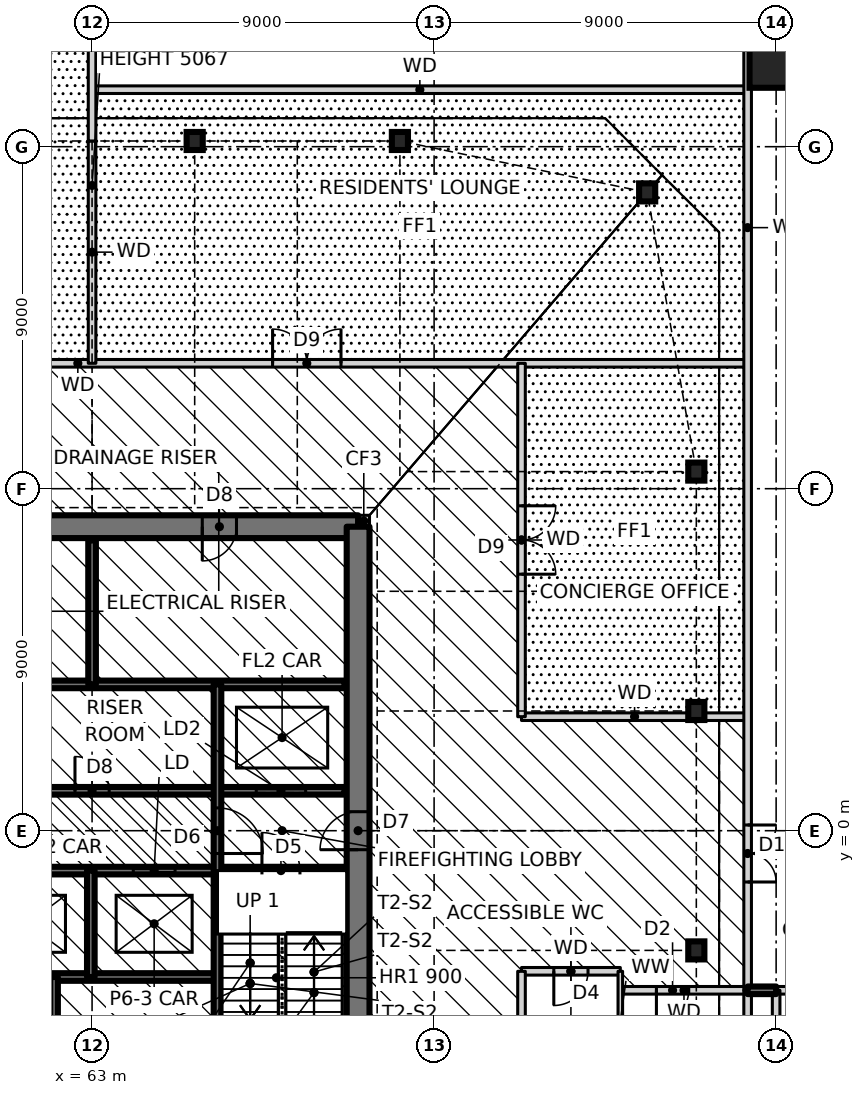
"""IFC4 building model, lengths in metres.
Left out: names, types, materials, properties, quantities, classifications, styles, units other than length and angle.
Written with IfcOpenShell. Run it as: python <this file> out.ifc"""

import sys

from ifc_helpers import new_model, si_unit, direction, frame, frame_2d, origin, origin_2d, place, context, subcontext, project, spatial, rectangle, hollow_rectangle, i_section, extrude, element, fill, save


model = new_model("IFC4")
c1 = context("Model", 3, precision=1e-05, world=origin(), true_north=direction((0.0, 1.0)))
c2 = subcontext(c1, "Body", "Model", "MODEL_VIEW")
j1 = project(units=[si_unit("LENGTHUNIT", "METRE"), si_unit("PLANEANGLEUNIT", "RADIAN")], contexts=[c1])
p1 = place(None, origin())
s1 = spatial("IfcSite", under=j1, at=p1, CompositionType="ELEMENT")
p2 = place(p1, origin())
s2 = spatial("IfcBuilding", under=s1, at=p2, CompositionType="ELEMENT")
p3 = place(p2, origin())
s3 = spatial("IfcBuildingStorey", under=s2, at=p3, CompositionType="ELEMENT", Elevation=0.0)
for number, where, z_axis, x_axis in (
    (1, (78.9, -3.15, 0.0), (0.0, 0.0, 1.0), (1.0, 0.0, 0.0)),
    (2, (78.9, 3.15, 0.0), (0.0, 0.0, 1.0), (1.0, 0.0, 0.0)),
    (3, (78.9, 9.45, 0.0), (0.0, 0.0, 1.0), (1.0, 0.0, 0.0)),
    (4, (77.606, 16.797, 0.0), (0.0, 0.0, 1.0), (1.0, 0.0, 0.0)),
    (5, (71.1, 18.15, 0.0), (0.0, 0.0, 1.0), (1.0, 0.0, 0.0)),
    (6, (65.7, 18.15, 0.0), (0.0, 0.0, 1.0), (1.0, 0.0, 0.0)),
):
    element("IfcColumn", number, at=place(p3, frame(where, z_axis=z_axis, x_axis=x_axis)), inside=s3, PredefinedType="COLUMN", context=c2, shape_type="SweptSolid", body=[
        extrude(i_section(OverallWidth=0.424, OverallDepth=0.475, WebThickness=0.048, FlangeThickness=0.077, at=origin_2d()), origin(), (0.0, 0.0, 1.0), 6.0),
    ])
p4 = place(p3, frame((80.9, 20.15, 0.0), z_axis=(0.0, 0.0, 1.0), x_axis=(1.0, 0.0, 0.0)))
e7 = element("IfcColumn", 7, at=p4, inside=s3, PredefinedType="COLUMN", context=c2, shape_type="SweptSolid", body=[
    extrude(hollow_rectangle(XDim=1.2, YDim=1.2, WallThickness=0.07, at=origin_2d()), origin(), (0.0, 0.0, 1.0), 6.0),
])
p5 = place(p3, frame((70.0, 8.15, 0.0), z_axis=(0.0, 0.0, 1.0), x_axis=(1.0, 0.0, 0.0)))
e8 = element("IfcWall", 8, at=p5, inside=s3, PredefinedType="SOLIDWALL", context=c2, shape_type="SweptSolid", body=[
    extrude(rectangle(XDim=0.3, YDim=0.3, at=frame_2d((0.15, 0.0))), origin(), (0.0, 0.0, 1.0), 6.0),
])
p6 = place(p3, frame((70.0, 8.0, 0.0), z_axis=(0.0, 0.0, 1.0), x_axis=(-1.0, 0.0, 0.0)))
e9 = element("IfcWall", 9, at=p6, inside=s3, PredefinedType="SHEAR", context=c2, shape_type="SweptSolid", body=[
    extrude(rectangle(XDim=14.0, YDim=0.6, at=frame_2d((7.0, 0.0))), origin(), (0.0, 0.0, 1.0), 6.0),
])
p7 = place(p6, frame((8.2, 0.0, 0.0)))
e10 = element("IfcOpeningElement", 10, at=p7, cuts=e9, PredefinedType="OPENING", context=c2, shape_type="SweptSolid", body=[
    extrude(rectangle(XDim=0.9, YDim=2.1, at=frame_2d((0.45, 1.05))), frame((0.0, 0.31, 0.0), z_axis=(0.0, -1.0, 0.0), x_axis=(1.0, 0.0, 0.0)), (0.0, 0.0, 1.0), 0.62),
])
p8 = place(p6, frame((3.2, 0.0, 0.0)))
e11 = element("IfcOpeningElement", 11, at=p8, cuts=e9, PredefinedType="OPENING", context=c2, shape_type="SweptSolid", body=[
    extrude(rectangle(XDim=0.9, YDim=2.1, at=frame_2d((0.45, 1.05))), frame((0.0, 0.31, 0.0), z_axis=(0.0, -1.0, 0.0), x_axis=(1.0, 0.0, 0.0)), (0.0, 0.0, 1.0), 0.62),
])
p9 = place(p3, frame((70.0, -8.0, 0.0), z_axis=(0.0, 0.0, 1.0), x_axis=(0.0, 1.0, 0.0)))
e12 = element("IfcWall", 12, at=p9, inside=s3, PredefinedType="SHEAR", context=c2, shape_type="SweptSolid", body=[
    extrude(rectangle(XDim=16.0, YDim=0.6, at=frame_2d((8.0, 0.0))), origin(), (0.0, 0.0, 1.0), 6.0),
])
p10 = place(p9, frame((7.5, 0.0, 0.0)))
e13 = element("IfcOpeningElement", 13, at=p10, cuts=e12, PredefinedType="OPENING", context=c2, shape_type="SweptSolid", body=[
    extrude(rectangle(XDim=1.0, YDim=2.1, at=frame_2d((0.5, 1.05))), frame((0.0, 0.31, 0.0), z_axis=(0.0, -1.0, 0.0), x_axis=(1.0, 0.0, 0.0)), (0.0, 0.0, 1.0), 0.62),
])
p11 = place(p3, frame((76.9, -4.2, 0.0), z_axis=(0.0, 0.0, 1.0), x_axis=(1.0, 0.0, 0.0)))
e14 = element("IfcWall", 14, at=p11, inside=s3, PredefinedType="SOLIDWALL", context=c2, shape_type="SweptSolid", body=[
    extrude(rectangle(XDim=3.35, YDim=0.2, at=frame_2d((1.675, 0.0))), origin(), (0.0, 0.0, 1.0), 5.75),
])
p12 = place(p11, frame((0.95, 0.0, 0.0)))
e15 = element("IfcOpeningElement", 15, at=p12, cuts=e14, PredefinedType="OPENING", context=c2, shape_type="SweptSolid", body=[
    extrude(rectangle(XDim=0.85, YDim=2.1, at=frame_2d((0.425, 1.05))), frame((0.0, 0.11, 0.0), z_axis=(0.0, -1.0, 0.0), x_axis=(1.0, 0.0, 0.0)), (0.0, 0.0, 1.0), 0.22),
])
p13 = place(p3, frame((80.25, -4.2, -0.25), z_axis=(0.0, 0.0, 1.0), x_axis=(1.0, 0.0, 0.0)))
e16 = element("IfcWall", 16, at=p13, inside=s3, PredefinedType="SOLIDWALL", context=c2, shape_type="SweptSolid", body=[
    extrude(rectangle(XDim=0.75, YDim=0.2, at=frame_2d((0.375, 0.0))), origin(), (0.0, 0.0, 1.0), 6.25),
])
p14 = place(p3, frame((81.0, -4.2, 0.0), z_axis=(0.0, 0.0, 1.0), x_axis=(1.0, 0.0, 0.0)))
e17 = element("IfcWall", 17, at=p14, inside=s3, PredefinedType="SOLIDWALL", context=c2, shape_type="SweptSolid", body=[
    extrude(rectangle(XDim=8.94, YDim=0.2, at=frame_2d((4.47, 0.0))), origin(), (0.0, 0.0, 1.0), 5.75),
])
p15 = place(p3, frame((56.36, -3.85, 0.0), z_axis=(0.0, 0.0, 1.0), x_axis=(1.0, 0.0, 0.0)))
e18 = element("IfcWall", 18, at=p15, inside=s3, PredefinedType="SOLIDWALL", context=c2, shape_type="SweptSolid", body=[
    extrude(rectangle(XDim=9.94, YDim=0.2, at=frame_2d((4.97, 0.0))), origin(), (0.0, 0.0, 1.0), 6.0),
])
p16 = place(p3, frame((74.3, -3.7, 0.0), z_axis=(0.0, 0.0, 1.0), x_axis=(1.0, 0.0, 0.0)))
e19 = element("IfcWall", 19, at=p16, inside=s3, PredefinedType="SOLIDWALL", context=c2, shape_type="SweptSolid", body=[
    extrude(rectangle(XDim=2.6, YDim=0.2, at=frame_2d((1.3, 0.0))), origin(), (0.0, 0.0, 1.0), 5.75),
])
p17 = place(p16, frame((0.85, 0.0, 0.0)))
e20 = element("IfcOpeningElement", 20, at=p17, cuts=e19, PredefinedType="OPENING", context=c2, shape_type="SweptSolid", body=[
    extrude(rectangle(XDim=0.9, YDim=2.1, at=frame_2d((0.45, 1.05))), frame((0.0, 0.11, 0.0), z_axis=(0.0, -1.0, 0.0), x_axis=(1.0, 0.0, 0.0)), (0.0, 0.0, 1.0), 0.22),
])
p18 = place(p3, frame((56.36, -1.05, 0.0), z_axis=(0.0, 0.0, 1.0), x_axis=(1.0, 0.0, 0.0)))
e21 = element("IfcWall", 21, at=p18, inside=s3, PredefinedType="SOLIDWALL", context=c2, shape_type="SweptSolid", body=[
    extrude(rectangle(XDim=13.28, YDim=0.2, at=frame_2d((6.64, 0.0))), origin(), (0.0, 0.0, 1.0), 6.0),
])
p19 = place(p18, frame((11.11, 0.0, 0.0)))
e22 = element("IfcOpeningElement", 22, at=p19, cuts=e21, PredefinedType="OPENING", context=c2, shape_type="SweptSolid", body=[
    extrude(rectangle(XDim=1.0, YDim=2.1, at=frame_2d((0.5, 1.05))), frame((0.0, 0.11, 0.0), z_axis=(0.0, -1.0, 0.0), x_axis=(1.0, 0.0, 0.0)), (0.0, 0.0, 1.0), 0.22),
])
p20 = place(p18, frame((1.087, 0.0, 0.0)))
e23 = element("IfcOpeningElement", 23, at=p20, cuts=e21, PredefinedType="OPENING", context=c2, shape_type="SweptSolid", body=[
    extrude(rectangle(XDim=1.1, YDim=2.1, at=frame_2d((0.55, 1.05))), frame((0.0, 0.11, 0.0), z_axis=(0.0, -1.0, 0.0), x_axis=(1.0, 0.0, 0.0)), (0.0, 0.0, 1.0), 0.22),
])
p21 = place(p18, frame((4.39, 0.0, 0.0)))
e24 = element("IfcOpeningElement", 24, at=p21, cuts=e21, PredefinedType="OPENING", context=c2, shape_type="SweptSolid", body=[
    extrude(rectangle(XDim=1.1, YDim=2.1, at=frame_2d((0.55, 1.05))), frame((0.0, 0.11, 0.0), z_axis=(0.0, -1.0, 0.0), x_axis=(1.0, 0.0, 0.0)), (0.0, 0.0, 1.0), 0.22),
])
p22 = place(p18, frame((7.724, 0.0, 0.0)))
e25 = element("IfcOpeningElement", 25, at=p22, cuts=e21, PredefinedType="OPENING", context=c2, shape_type="SweptSolid", body=[
    extrude(rectangle(XDim=1.1, YDim=2.1, at=frame_2d((0.55, 1.05))), frame((0.0, 0.11, 0.0), z_axis=(0.0, -1.0, 0.0), x_axis=(1.0, 0.0, 0.0)), (0.0, 0.0, 1.0), 0.22),
])
p23 = place(p3, frame((56.36, 1.05, 0.0), z_axis=(0.0, 0.0, 1.0), x_axis=(1.0, 0.0, 0.0)))
e26 = element("IfcWall", 26, at=p23, inside=s3, PredefinedType="SOLIDWALL", context=c2, shape_type="SweptSolid", body=[
    extrude(rectangle(XDim=13.28, YDim=0.2, at=frame_2d((6.64, 0.0))), origin(), (0.0, 0.0, 1.0), 6.0),
])
p24 = place(p23, frame((1.17, 0.0, 0.0)))
e27 = element("IfcOpeningElement", 27, at=p24, cuts=e26, PredefinedType="OPENING", context=c2, shape_type="SweptSolid", body=[
    extrude(rectangle(XDim=1.0, YDim=2.1, at=frame_2d((0.5, 1.05))), frame((0.0, 0.11, 0.0), z_axis=(0.0, -1.0, 0.0), x_axis=(1.0, 0.0, 0.0)), (0.0, 0.0, 1.0), 0.22),
])
p25 = place(p23, frame((6.19, 0.0, 0.0)))
e28 = element("IfcOpeningElement", 28, at=p25, cuts=e26, PredefinedType="OPENING", context=c2, shape_type="SweptSolid", body=[
    extrude(rectangle(XDim=0.9, YDim=2.1, at=frame_2d((0.45, 1.05))), frame((0.0, 0.11, 0.0), z_axis=(0.0, -1.0, 0.0), x_axis=(1.0, 0.0, 0.0)), (0.0, 0.0, 1.0), 0.22),
])
p26 = place(p23, frame((10.96, 0.0, 0.0)))
e29 = element("IfcOpeningElement", 29, at=p26, cuts=e26, PredefinedType="OPENING", context=c2, shape_type="SweptSolid", body=[
    extrude(rectangle(XDim=1.3, YDim=2.1, at=frame_2d((0.65, 1.05))), frame((0.0, 0.11, 0.0), z_axis=(0.0, -1.0, 0.0), x_axis=(1.0, 0.0, 0.0)), (0.0, 0.0, 1.0), 0.22),
])
p27 = place(p3, frame((74.3, 3.0, 0.0), z_axis=(0.0, 0.0, 1.0), x_axis=(1.0, 0.0, 0.0)))
e30 = element("IfcWall", 30, at=p27, inside=s3, PredefinedType="SOLIDWALL", context=c2, shape_type="SweptSolid", body=[
    extrude(rectangle(XDim=5.95, YDim=0.2, at=frame_2d((2.975, 0.0))), origin(), (0.0, 0.0, 1.0), 5.75),
])
p28 = place(p3, frame((59.7, 3.85, 0.0), z_axis=(0.0, 0.0, 1.0), x_axis=(1.0, 0.0, 0.0)))
e31 = element("IfcWall", 31, at=p28, inside=s3, PredefinedType="SOLIDWALL", context=c2, shape_type="SweptSolid", body=[
    extrude(rectangle(XDim=9.94, YDim=0.2, at=frame_2d((4.97, 0.0))), origin(), (0.0, 0.0, 1.0), 6.0),
])
p29 = place(p3, frame((45.0, 12.3, 0.0), z_axis=(0.0, 0.0, 1.0), x_axis=(1.0, 0.0, 0.0)))
e32 = element("IfcWall", 32, at=p29, inside=s3, PredefinedType="SOLIDWALL", context=c2, shape_type="SweptSolid", body=[
    extrude(rectangle(XDim=35.25, YDim=0.2, at=frame_2d((17.625, 0.0))), origin(), (0.0, 0.0, 1.0), 5.75),
])
p30 = place(p29, frame((8.1, 0.0, 0.0)))
e33 = element("IfcOpeningElement", 33, at=p30, cuts=e32, PredefinedType="OPENING", context=c2, shape_type="SweptSolid", body=[
    extrude(rectangle(XDim=1.8, YDim=2.1, at=frame_2d((0.9, 1.05))), frame((0.0, 0.11, 0.0), z_axis=(0.0, -1.0, 0.0), x_axis=(1.0, 0.0, 0.0)), (0.0, 0.0, 1.0), 0.22),
])
p31 = place(p29, frame((22.75, 0.0, 0.0)))
e34 = element("IfcOpeningElement", 34, at=p31, cuts=e32, PredefinedType="OPENING", context=c2, shape_type="SweptSolid", body=[
    extrude(rectangle(XDim=1.8, YDim=2.1, at=frame_2d((0.9, 1.05))), frame((0.0, 0.11, 0.0), z_axis=(0.0, -1.0, 0.0), x_axis=(1.0, 0.0, 0.0)), (0.0, 0.0, 1.0), 0.22),
])
p32 = place(p3, frame((63.0, 19.5, 0.0), z_axis=(0.0, 0.0, 1.0), x_axis=(1.0, 0.0, 0.0)))
e35 = element("IfcWall", 35, at=p32, inside=s3, PredefinedType="SOLIDWALL", context=c2, shape_type="SweptSolid", body=[
    extrude(rectangle(XDim=17.25, YDim=0.2, at=frame_2d((8.625, 0.0))), origin(), (0.0, 0.0, 1.0), 5.75),
])
for number, where, z_axis, x_axis in (
    (36, (81.0, -19.5, 0.0), (0.0, 0.0, 1.0), (0.0, 1.0, 0.0)),
    (37, (80.25, -19.5, 0.0), (0.0, 0.0, 1.0), (0.0, 1.0, 0.0)),
):
    element("IfcWall", number, at=place(p3, frame(where, z_axis=z_axis, x_axis=x_axis)), inside=s3, PredefinedType="SOLIDWALL", context=c2, shape_type="SweptSolid", body=[
        extrude(rectangle(XDim=15.3, YDim=0.2, at=frame_2d((7.65, 0.0))), origin(), (0.0, 0.0, 1.0), 6.0),
    ])
p33 = place(p3, frame((80.25, -4.2, 0.0), z_axis=(0.0, 0.0, 1.0), x_axis=(0.0, 1.0, 0.0)))
e38 = element("IfcWall", 38, at=p33, inside=s3, PredefinedType="SOLIDWALL", context=c2, shape_type="SweptSolid", body=[
    extrude(rectangle(XDim=40.14, YDim=0.2, at=frame_2d((20.07, 0.0))), origin(), (0.0, 0.0, 1.0), 5.75),
])
p34 = place(p33, frame((2.85, 0.0, 0.0)))
e39 = element("IfcOpeningElement", 39, at=p34, cuts=e38, PredefinedType="OPENING", context=c2, shape_type="SweptSolid", body=[
    extrude(rectangle(XDim=1.5, YDim=2.4, at=frame_2d((0.75, 1.2))), frame((0.0, 0.11, 0.0), z_axis=(0.0, -1.0, 0.0), x_axis=(1.0, 0.0, 0.0)), (0.0, 0.0, 1.0), 0.22),
])
p35 = place(p3, frame((76.9, -6.3, 0.0), z_axis=(0.0, 0.0, 1.0), x_axis=(0.0, 1.0, 0.0)))
e40 = element("IfcWall", 40, at=p35, inside=s3, PredefinedType="PARTITIONING", context=c2, shape_type="SweptSolid", body=[
    extrude(rectangle(XDim=2.6, YDim=0.12, at=frame_2d((1.3, 0.0))), origin(), (0.0, 0.0, 1.0), 5.75),
])
p36 = place(p3, frame((74.3, -12.3, 0.0), z_axis=(0.0, 0.0, 1.0), x_axis=(0.0, 1.0, 0.0)))
e41 = element("IfcWall", 41, at=p36, inside=s3, PredefinedType="SOLIDWALL", context=c2, shape_type="SweptSolid", body=[
    extrude(rectangle(XDim=8.6, YDim=0.2, at=frame_2d((4.3, 0.0))), origin(), (0.0, 0.0, 1.0), 5.75),
])
p37 = place(p36, frame((1.05, 0.0, 0.0)))
e42 = element("IfcOpeningElement", 42, at=p37, cuts=e41, PredefinedType="OPENING", context=c2, shape_type="SweptSolid", body=[
    extrude(rectangle(XDim=0.9, YDim=2.1, at=frame_2d((0.45, 1.05))), frame((0.0, 0.11, 0.0), z_axis=(0.0, -1.0, 0.0), x_axis=(1.0, 0.0, 0.0)), (0.0, 0.0, 1.0), 0.22),
])
p38 = place(p36, frame((4.05, 0.0, 0.0)))
e43 = element("IfcOpeningElement", 43, at=p38, cuts=e41, PredefinedType="OPENING", context=c2, shape_type="SweptSolid", body=[
    extrude(rectangle(XDim=0.9, YDim=2.1, at=frame_2d((0.45, 1.05))), frame((0.0, 0.11, 0.0), z_axis=(0.0, -1.0, 0.0), x_axis=(1.0, 0.0, 0.0)), (0.0, 0.0, 1.0), 0.22),
])
p39 = place(p3, frame((74.3, 3.0, 0.0), z_axis=(0.0, 0.0, 1.0), x_axis=(0.0, 1.0, 0.0)))
e44 = element("IfcWall", 44, at=p39, inside=s3, PredefinedType="SOLIDWALL", context=c2, shape_type="SweptSolid", body=[
    extrude(rectangle(XDim=9.3, YDim=0.2, at=frame_2d((4.65, 0.0))), origin(), (0.0, 0.0, 1.0), 5.75),
])
p40 = place(p39, frame((3.75, 0.0, 0.0)))
e45 = element("IfcOpeningElement", 45, at=p40, cuts=e44, PredefinedType="OPENING", context=c2, shape_type="SweptSolid", body=[
    extrude(rectangle(XDim=1.8, YDim=2.1, at=frame_2d((0.9, 1.05))), frame((0.0, 0.11, 0.0), z_axis=(0.0, -1.0, 0.0), x_axis=(1.0, 0.0, 0.0)), (0.0, 0.0, 1.0), 0.22),
])
p41 = place(p3, frame((66.3, -7.64, 0.0), z_axis=(0.0, 0.0, 1.0), x_axis=(0.0, 1.0, 0.0)))
e46 = element("IfcWall", 46, at=p41, inside=s3, PredefinedType="SOLIDWALL", context=c2, shape_type="SweptSolid", body=[
    extrude(rectangle(XDim=11.49, YDim=0.2, at=frame_2d((5.745, 0.0))), origin(), (0.0, 0.0, 1.0), 6.0),
])
p42 = place(p41, frame((7.04, 0.0, 0.0)))
e47 = element("IfcOpeningElement", 47, at=p42, cuts=e46, PredefinedType="OPENING", context=c2, shape_type="SweptSolid", body=[
    extrude(rectangle(XDim=1.2, YDim=2.1, at=frame_2d((0.6, 1.05))), frame((0.0, 0.11, 0.0), z_axis=(0.0, -1.0, 0.0), x_axis=(1.0, 0.0, 0.0)), (0.0, 0.0, 1.0), 0.22),
])
p43 = place(p3, frame((63.0, 3.85, 0.0), z_axis=(0.0, 0.0, 1.0), x_axis=(0.0, 1.0, 0.0)))
e48 = element("IfcWall", 48, at=p43, inside=s3, PredefinedType="SOLIDWALL", context=c2, shape_type="SweptSolid", body=[
    extrude(rectangle(XDim=3.79, YDim=0.2, at=frame_2d((1.895, 0.0))), origin(), (0.0, 0.0, 1.0), 6.0),
])
p44 = place(p3, frame((63.0, 12.3, 0.0), z_axis=(0.0, 0.0, 1.0), x_axis=(0.0, 1.0, 0.0)))
e49 = element("IfcWall", 49, at=p44, inside=s3, PredefinedType="SOLIDWALL", context=c2, shape_type="SweptSolid", body=[
    extrude(rectangle(XDim=5.85, YDim=0.2, at=frame_2d((2.925, 0.0))), origin(), (0.0, 0.0, 1.0), 5.067),
])
p45 = place(p3, frame((62.967, -3.85, 0.0), z_axis=(0.0, 0.0, 1.0), x_axis=(0.0, 1.0, 0.0)))
e50 = element("IfcWall", 50, at=p45, inside=s3, PredefinedType="SOLIDWALL", context=c2, shape_type="SweptSolid", body=[
    extrude(rectangle(XDim=2.8, YDim=0.2, at=frame_2d((1.4, 0.0))), origin(), (0.0, 0.0, 1.0), 6.0),
])
p46 = place(p3, frame((62.0, -7.64, 0.0), z_axis=(0.0, 0.0, 1.0), x_axis=(0.0, 1.0, 0.0)))
e51 = element("IfcWall", 51, at=p46, inside=s3, PredefinedType="SOLIDWALL", context=c2, shape_type="SweptSolid", body=[
    extrude(rectangle(XDim=3.79, YDim=0.2, at=frame_2d((1.895, 0.0))), origin(), (0.0, 0.0, 1.0), 6.0),
])
p47 = place(p3, frame((63.0, 18.15, 0.0), z_axis=(0.0, 0.0, 1.0), x_axis=(0.0, 1.0, 0.0)))
e52 = element("IfcWall", 52, at=p47, inside=s3, PredefinedType="SOLIDWALL", context=c2, shape_type="SweptSolid", body=[
    extrude(rectangle(XDim=13.81, YDim=0.2, at=frame_2d((6.905, 0.0))), origin(), (0.0, 0.0, 1.0), 5.75),
])
p48 = place(p19, origin())
e53 = element("IfcDoor", 53, at=p48, inside=s3, OperationType="SINGLE_SWING_LEFT", PredefinedType="DOOR", context=c2, shape_type="SweptSolid", body=[
    extrude(rectangle(XDim=1.0, YDim=2.1, at=frame_2d((0.5, 1.05))), frame((0.0, 0.025, 0.0), z_axis=(0.0, -1.0, 0.0), x_axis=(1.0, 0.0, 0.0)), (0.0, 0.0, 1.0), 0.05),
])
fill(e22, e53)
p49 = place(p42, frame((1.2, 0.0, 0.0), z_axis=(0.0, 0.0, 1.0), x_axis=(-1.0, 0.0, 0.0)))
e54 = element("IfcDoor", 54, at=p49, inside=s3, OperationType="SINGLE_SWING_RIGHT", PredefinedType="DOOR", context=c2, shape_type="SweptSolid", body=[
    extrude(rectangle(XDim=1.2, YDim=2.1, at=frame_2d((0.6, 1.05))), frame((0.0, 0.025, 0.0), z_axis=(0.0, -1.0, 0.0), x_axis=(1.0, 0.0, 0.0)), (0.0, 0.0, 1.0), 0.05),
])
fill(e47, e54)
p50 = place(p25, origin())
e55 = element("IfcDoor", 55, at=p50, inside=s3, OperationType="SINGLE_SWING_LEFT", PredefinedType="DOOR", context=c2, shape_type="SweptSolid", body=[
    extrude(rectangle(XDim=0.9, YDim=2.1, at=frame_2d((0.45, 1.05))), frame((0.0, 0.025, 0.0), z_axis=(0.0, -1.0, 0.0), x_axis=(1.0, 0.0, 0.0)), (0.0, 0.0, 1.0), 0.05),
])
fill(e28, e55)
p51 = place(p34, frame((1.5, 0.0, 0.0), z_axis=(0.0, 0.0, 1.0), x_axis=(-1.0, 0.0, 0.0)))
e56 = element("IfcDoor", 56, at=p51, inside=s3, OperationType="DOUBLE_DOOR_SINGLE_SWING", PredefinedType="DOOR", context=c2, shape_type="SweptSolid", body=[
    extrude(rectangle(XDim=1.5, YDim=2.4, at=frame_2d((0.75, 1.2))), frame((0.0, 0.025, 0.0), z_axis=(0.0, -1.0, 0.0), x_axis=(1.0, 0.0, 0.0)), (0.0, 0.0, 1.0), 0.05),
])
fill(e39, e56)
p52 = place(p17, frame((0.9, 0.0, 0.0), z_axis=(0.0, 0.0, 1.0), x_axis=(-1.0, 0.0, 0.0)))
e57 = element("IfcDoor", 57, at=p52, inside=s3, OperationType="SINGLE_SWING_RIGHT", PredefinedType="DOOR", context=c2, shape_type="SweptSolid", body=[
    extrude(rectangle(XDim=0.9, YDim=2.1, at=frame_2d((0.45, 1.05))), frame((0.0, 0.025, 0.0), z_axis=(0.0, -1.0, 0.0), x_axis=(1.0, 0.0, 0.0)), (0.0, 0.0, 1.0), 0.05),
])
fill(e20, e57)
p53 = place(p12, frame((0.85, 0.0, 0.0), z_axis=(0.0, 0.0, 1.0), x_axis=(-1.0, 0.0, 0.0)))
e58 = element("IfcDoor", 58, at=p53, inside=s3, OperationType="SINGLE_SWING_RIGHT", PredefinedType="DOOR", context=c2, shape_type="SweptSolid", body=[
    extrude(rectangle(XDim=0.85, YDim=2.1, at=frame_2d((0.425, 1.05))), frame((0.0, 0.025, 0.0), z_axis=(0.0, -1.0, 0.0), x_axis=(1.0, 0.0, 0.0)), (0.0, 0.0, 1.0), 0.05),
])
fill(e15, e58)
p54 = place(p31, origin())
e59 = element("IfcDoor", 59, at=p54, inside=s3, OperationType="DOUBLE_DOOR_SINGLE_SWING", PredefinedType="DOOR", context=c2, shape_type="SweptSolid", body=[
    extrude(rectangle(XDim=1.8, YDim=2.1, at=frame_2d((0.9, 1.05))), frame((0.0, 0.025, 0.0), z_axis=(0.0, -1.0, 0.0), x_axis=(1.0, 0.0, 0.0)), (0.0, 0.0, 1.0), 0.05),
])
fill(e34, e59)
p55 = place(p40, frame((1.8, 0.0, 0.0), z_axis=(0.0, 0.0, 1.0), x_axis=(-1.0, 0.0, 0.0)))
e60 = element("IfcDoor", 60, at=p55, inside=s3, OperationType="DOUBLE_DOOR_SINGLE_SWING", PredefinedType="DOOR", context=c2, shape_type="SweptSolid", body=[
    extrude(rectangle(XDim=1.8, YDim=2.1, at=frame_2d((0.9, 1.05))), frame((0.0, 0.025, 0.0), z_axis=(0.0, -1.0, 0.0), x_axis=(1.0, 0.0, 0.0)), (0.0, 0.0, 1.0), 0.05),
])
fill(e45, e60)
p56 = place(p10, origin())
e61 = element("IfcDoor", 61, at=p56, inside=s3, OperationType="SINGLE_SWING_LEFT", PredefinedType="DOOR", context=c2, shape_type="SweptSolid", body=[
    extrude(rectangle(XDim=1.0, YDim=2.1, at=frame_2d((0.5, 1.05))), frame((0.0, 0.025, 0.0), z_axis=(0.0, -1.0, 0.0), x_axis=(1.0, 0.0, 0.0)), (0.0, 0.0, 1.0), 0.05),
])
fill(e13, e61)
p57 = place(p8, origin())
e62 = element("IfcDoor", 62, at=p57, inside=s3, OperationType="SINGLE_SWING_RIGHT", PredefinedType="DOOR", context=c2, shape_type="SweptSolid", body=[
    extrude(rectangle(XDim=0.9, YDim=2.1, at=frame_2d((0.45, 1.05))), frame((0.0, 0.025, 0.0), z_axis=(0.0, -1.0, 0.0), x_axis=(1.0, 0.0, 0.0)), (0.0, 0.0, 1.0), 0.05),
])
fill(e11, e62)
p58 = place(p22, origin())
e63 = element("IfcDoor", 63, at=p58, inside=s3, OperationType="DOUBLE_DOOR_SLIDING", PredefinedType="DOOR", context=c2, shape_type="SweptSolid", body=[
    extrude(rectangle(XDim=1.1, YDim=2.1, at=frame_2d((0.55, 1.05))), frame((0.0, 0.025, 0.0), z_axis=(0.0, -1.0, 0.0), x_axis=(1.0, 0.0, 0.0)), (0.0, 0.0, 1.0), 0.05),
])
fill(e25, e63)
p59 = place(p26, origin())
e64 = element("IfcDoor", 64, at=p59, inside=s3, OperationType="SLIDING_TO_LEFT", PredefinedType="DOOR", context=c2, shape_type="SweptSolid", body=[
    extrude(rectangle(XDim=1.3, YDim=2.1, at=frame_2d((0.65, 1.05))), frame((0.0, 0.025, 0.0), z_axis=(0.0, -1.0, 0.0), x_axis=(1.0, 0.0, 0.0)), (0.0, 0.0, 1.0), 0.05),
])
fill(e29, e64)
save(model, sys.argv[1])
